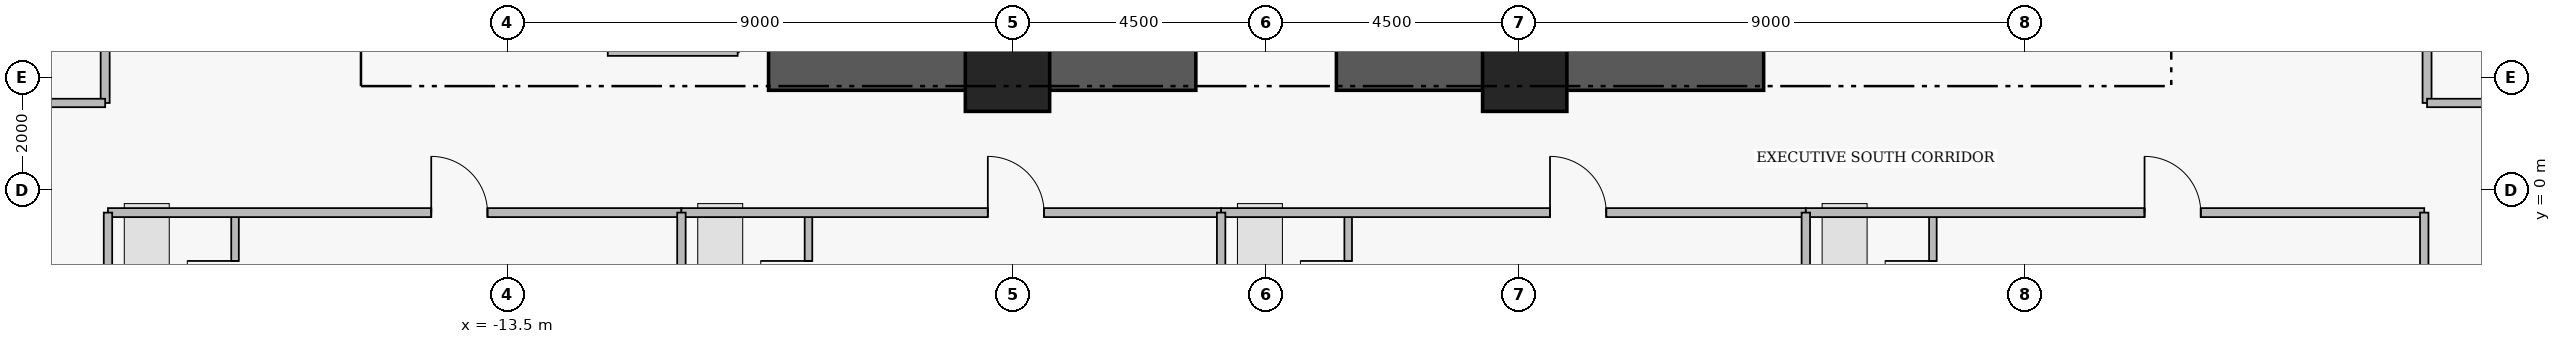
"""IFC4 building model, lengths in metres.
Left out: names, types, materials, properties, quantities, classifications, styles, units other than length and angle.
Written with IfcOpenShell. Run it as: python <this file> out.ifc"""

import sys

from ifc_helpers import new_model, si_unit, direction, frame, frame_2d, origin, origin_2d, place, context, subcontext, project, spatial, rectangle, extrude, element, fill, save


model = new_model("IFC4")
c1 = context("Model", 3, precision=1e-05, world=origin(), true_north=direction((0.0, 1.0)))
c2 = subcontext(c1, "Body", "Model", "MODEL_VIEW")
j1 = project(units=[si_unit("LENGTHUNIT", "METRE"), si_unit("PLANEANGLEUNIT", "RADIAN")], contexts=[c1])
p1 = place(None, origin())
s1 = spatial("IfcSite", under=j1, at=p1, CompositionType="ELEMENT")
p2 = place(p1, origin())
s2 = spatial("IfcBuilding", under=s1, at=p2, CompositionType="ELEMENT")
p3 = place(p2, frame((0.0, 0.0, 139.45)))
s3 = spatial("IfcBuildingStorey", under=s2, at=p3, CompositionType="ELEMENT", Elevation=139.45)
for number, where, z_axis, x_axis in (
    (1, (-8.85, 2.15, 0.0), (0.0, 0.0, 1.0), (1.0, 0.0, 0.0)),
    (2, (1.25, 2.15, 0.0), (0.0, 0.0, 1.0), (1.0, 0.0, 0.0)),
):
    element("IfcWall", number, at=place(p3, frame(where, z_axis=z_axis, x_axis=x_axis)), inside=s3, PredefinedType="SHEAR", context=c2, shape_type="SweptSolid", body=[
        extrude(rectangle(XDim=7.6, YDim=0.75, at=frame_2d((3.8, 0.0))), origin(), (0.0, 0.0, 1.0), 3.43),
    ])
for number, where, z_axis, x_axis in (
    (3, (-4.6, 2.15, 0.0), (0.0, 0.0, 1.0), (1.0, 0.0, 0.0)),
    (4, (4.6, 2.15, 0.0), (0.0, 0.0, 1.0), (1.0, 0.0, 0.0)),
):
    element("IfcColumn", number, at=place(p3, frame(where, z_axis=z_axis, x_axis=x_axis)), inside=s3, PredefinedType="COLUMN", context=c2, shape_type="SweptSolid", body=[
        extrude(rectangle(XDim=1.5, YDim=1.5, at=origin_2d()), origin(), (0.0, 0.0, 1.0), 3.65),
    ])
p4 = place(p3, frame((-18.34, -2.76, 0.0), z_axis=(0.0, 0.0, 1.0), x_axis=(0.0, 1.0, 0.0)))
e5 = element("IfcWall", 5, at=p4, inside=s3, PredefinedType="PLUMBINGWALL", context=c2, shape_type="SweptSolid", body=[
    extrude(rectangle(XDim=2.36, YDim=0.135, at=frame_2d((1.18, 0.0))), origin(), (0.0, 0.0, 1.0), 3.43),
])
p5 = place(p4, frame((0.65, 0.0, 0.0)))
e6 = element("IfcOpeningElement", 6, at=p5, cuts=e5, PredefinedType="OPENING", context=c2, shape_type="SweptSolid", body=[
    extrude(rectangle(XDim=0.85, YDim=2.1, at=frame_2d((0.425, 1.05))), frame((0.0, 0.077, 0.0), z_axis=(0.0, -1.0, 0.0), x_axis=(1.0, 0.0, 0.0)), (0.0, 0.0, 1.0), 0.155),
])
p6 = place(p3, frame((-20.6, -0.4, 0.0), z_axis=(0.0, 0.0, 1.0), x_axis=(1.0, 0.0, 0.0)))
e7 = element("IfcWall", 7, at=p6, inside=s3, PredefinedType="PARTITIONING", context=c2, shape_type="SweptSolid", body=[
    extrude(rectangle(XDim=10.2, YDim=0.16, at=frame_2d((5.1, 0.0))), origin(), (0.0, 0.0, 1.0), 3.43),
])
p7 = place(p6, frame((5.75, 0.0, 0.0)))
e8 = element("IfcOpeningElement", 8, at=p7, cuts=e7, PredefinedType="OPENING", context=c2, shape_type="SweptSolid", body=[
    extrude(rectangle(XDim=1.0, YDim=2.15, at=frame_2d((0.5, 1.075))), frame((0.0, 0.09, 0.0), z_axis=(0.0, -1.0, 0.0), x_axis=(1.0, 0.0, 0.0)), (0.0, 0.0, 1.0), 0.18),
])
p8 = place(p3, frame((-8.14, -2.76, 0.0), z_axis=(0.0, 0.0, 1.0), x_axis=(0.0, 1.0, 0.0)))
e9 = element("IfcWall", 9, at=p8, inside=s3, PredefinedType="PLUMBINGWALL", context=c2, shape_type="SweptSolid", body=[
    extrude(rectangle(XDim=2.36, YDim=0.135, at=frame_2d((1.18, 0.0))), origin(), (0.0, 0.0, 1.0), 3.43),
])
p9 = place(p8, frame((0.65, 0.0, 0.0)))
e10 = element("IfcOpeningElement", 10, at=p9, cuts=e9, PredefinedType="OPENING", context=c2, shape_type="SweptSolid", body=[
    extrude(rectangle(XDim=0.85, YDim=2.1, at=frame_2d((0.425, 1.05))), frame((0.0, 0.077, 0.0), z_axis=(0.0, -1.0, 0.0), x_axis=(1.0, 0.0, 0.0)), (0.0, 0.0, 1.0), 0.155),
])
p10 = place(p3, frame((-10.4, -0.4, 0.0), z_axis=(0.0, 0.0, 1.0), x_axis=(1.0, 0.0, 0.0)))
e11 = element("IfcWall", 11, at=p10, inside=s3, PredefinedType="PARTITIONING", context=c2, shape_type="SweptSolid", body=[
    extrude(rectangle(XDim=9.6, YDim=0.16, at=frame_2d((4.8, 0.0))), origin(), (0.0, 0.0, 1.0), 3.43),
])
p11 = place(p10, frame((5.45, 0.0, 0.0)))
e12 = element("IfcOpeningElement", 12, at=p11, cuts=e11, PredefinedType="OPENING", context=c2, shape_type="SweptSolid", body=[
    extrude(rectangle(XDim=1.0, YDim=2.15, at=frame_2d((0.5, 1.075))), frame((0.0, 0.09, 0.0), z_axis=(0.0, -1.0, 0.0), x_axis=(1.0, 0.0, 0.0)), (0.0, 0.0, 1.0), 0.18),
])
p12 = place(p3, frame((1.46, -2.76, 0.0), z_axis=(0.0, 0.0, 1.0), x_axis=(0.0, 1.0, 0.0)))
e13 = element("IfcWall", 13, at=p12, inside=s3, PredefinedType="PLUMBINGWALL", context=c2, shape_type="SweptSolid", body=[
    extrude(rectangle(XDim=2.36, YDim=0.135, at=frame_2d((1.18, 0.0))), origin(), (0.0, 0.0, 1.0), 3.43),
])
p13 = place(p12, frame((0.65, 0.0, 0.0)))
e14 = element("IfcOpeningElement", 14, at=p13, cuts=e13, PredefinedType="OPENING", context=c2, shape_type="SweptSolid", body=[
    extrude(rectangle(XDim=0.85, YDim=2.1, at=frame_2d((0.425, 1.05))), frame((0.0, 0.077, 0.0), z_axis=(0.0, -1.0, 0.0), x_axis=(1.0, 0.0, 0.0)), (0.0, 0.0, 1.0), 0.155),
])
p14 = place(p3, frame((-0.8, -0.4, 0.0), z_axis=(0.0, 0.0, 1.0), x_axis=(1.0, 0.0, 0.0)))
e15 = element("IfcWall", 15, at=p14, inside=s3, PredefinedType="PARTITIONING", context=c2, shape_type="SweptSolid", body=[
    extrude(rectangle(XDim=10.4, YDim=0.16, at=frame_2d((5.2, 0.0))), origin(), (0.0, 0.0, 1.0), 3.43),
])
p15 = place(p14, frame((5.85, 0.0, 0.0)))
e16 = element("IfcOpeningElement", 16, at=p15, cuts=e15, PredefinedType="OPENING", context=c2, shape_type="SweptSolid", body=[
    extrude(rectangle(XDim=1.0, YDim=2.15, at=frame_2d((0.5, 1.075))), frame((0.0, 0.09, 0.0), z_axis=(0.0, -1.0, 0.0), x_axis=(1.0, 0.0, 0.0)), (0.0, 0.0, 1.0), 0.18),
])
p16 = place(p3, frame((11.86, -2.76, 0.0), z_axis=(0.0, 0.0, 1.0), x_axis=(0.0, 1.0, 0.0)))
e17 = element("IfcWall", 17, at=p16, inside=s3, PredefinedType="PLUMBINGWALL", context=c2, shape_type="SweptSolid", body=[
    extrude(rectangle(XDim=2.36, YDim=0.135, at=frame_2d((1.18, 0.0))), origin(), (0.0, 0.0, 1.0), 3.43),
])
p17 = place(p16, frame((0.65, 0.0, 0.0)))
e18 = element("IfcOpeningElement", 18, at=p17, cuts=e17, PredefinedType="OPENING", context=c2, shape_type="SweptSolid", body=[
    extrude(rectangle(XDim=0.85, YDim=2.1, at=frame_2d((0.425, 1.05))), frame((0.0, 0.077, 0.0), z_axis=(0.0, -1.0, 0.0), x_axis=(1.0, 0.0, 0.0)), (0.0, 0.0, 1.0), 0.155),
])
p18 = place(p3, frame((9.6, -0.4, 0.0), z_axis=(0.0, 0.0, 1.0), x_axis=(1.0, 0.0, 0.0)))
e19 = element("IfcWall", 19, at=p18, inside=s3, PredefinedType="PARTITIONING", context=c2, shape_type="SweptSolid", body=[
    extrude(rectangle(XDim=11.0, YDim=0.16, at=frame_2d((5.5, 0.0))), origin(), (0.0, 0.0, 1.0), 3.43),
])
p19 = place(p18, frame((6.025, 0.0, 0.0)))
e20 = element("IfcOpeningElement", 20, at=p19, cuts=e19, PredefinedType="OPENING", context=c2, shape_type="SweptSolid", body=[
    extrude(rectangle(XDim=1.0, YDim=2.15, at=frame_2d((0.5, 1.075))), frame((0.0, 0.09, 0.0), z_axis=(0.0, -1.0, 0.0), x_axis=(1.0, 0.0, 0.0)), (0.0, 0.0, 1.0), 0.18),
])
p20 = place(p3, frame((20.65, 1.55, 0.0), z_axis=(0.0, 0.0, 1.0), x_axis=(0.0, 1.0, 0.0)))
e21 = element("IfcWall", 21, at=p20, inside=s3, PredefinedType="PARTITIONING", context=c2, shape_type="SweptSolid", body=[
    extrude(rectangle(XDim=5.2, YDim=0.16, at=frame_2d((2.6, 0.0))), origin(), (0.0, 0.0, 1.0), 3.43),
])
p21 = place(p20, frame((2.14, 0.0, 0.0)))
e22 = element("IfcOpeningElement", 22, at=p21, cuts=e21, PredefinedType="OPENING", context=c2, shape_type="SweptSolid", body=[
    extrude(rectangle(XDim=0.92, YDim=2.12, at=frame_2d((0.46, 1.06))), frame((0.0, 0.09, 0.0), z_axis=(0.0, -1.0, 0.0), x_axis=(1.0, 0.0, 0.0)), (0.0, 0.0, 1.0), 0.18),
])
p22 = place(p3, frame((-20.65, 1.55, 0.0), z_axis=(0.0, 0.0, 1.0), x_axis=(0.0, 1.0, 0.0)))
e23 = element("IfcWall", 23, at=p22, inside=s3, PredefinedType="PARTITIONING", context=c2, shape_type="SweptSolid", body=[
    extrude(rectangle(XDim=13.3, YDim=0.16, at=frame_2d((6.65, 0.0))), origin(), (0.0, 0.0, 1.0), 3.43),
])
p23 = place(p22, frame((6.175, 0.0, 0.0)))
e24 = element("IfcOpeningElement", 24, at=p23, cuts=e23, PredefinedType="OPENING", context=c2, shape_type="SweptSolid", body=[
    extrude(rectangle(XDim=0.95, YDim=2.15, at=frame_2d((0.475, 1.075))), frame((0.0, 0.09, 0.0), z_axis=(0.0, -1.0, 0.0), x_axis=(1.0, 0.0, 0.0)), (0.0, 0.0, 1.0), 0.18),
])
p24 = place(p3, frame((-11.71, 2.47, 0.0), z_axis=(0.0, 0.0, 1.0), x_axis=(1.0, 0.0, 0.0)))
e25 = element("IfcWall", 25, at=p24, inside=s3, PredefinedType="PARTITIONING", context=c2, shape_type="SweptSolid", body=[
    extrude(rectangle(XDim=2.31, YDim=0.165, at=frame_2d((1.155, 0.0))), origin(), (0.0, 0.0, 1.0), 2.03),
])
p25 = place(p3, frame((-20.6, -11.9, 0.0), z_axis=(0.0, 0.0, 1.0), x_axis=(0.0, 1.0, 0.0)))
e26 = element("IfcWall", 26, at=p25, inside=s3, PredefinedType="PARTITIONING", context=c2, shape_type="SweptSolid", body=[
    extrude(rectangle(XDim=11.5, YDim=0.15, at=frame_2d((5.75, 0.0))), origin(), (0.0, 0.0, 1.0), 3.43),
])
for number, where, z_axis, x_axis in (
    (27, (-10.4, -15.32, 0.0), (0.0, 0.0, 1.0), (0.0, 1.0, 0.0)),
    (28, (-0.8, -15.32, 0.0), (0.0, 0.0, 1.0), (0.0, 1.0, 0.0)),
    (29, (9.6, -15.32, 0.0), (0.0, 0.0, 1.0), (0.0, 1.0, 0.0)),
):
    element("IfcWall", number, at=place(p3, frame(where, z_axis=z_axis, x_axis=x_axis)), inside=s3, PredefinedType="PARTITIONING", context=c2, shape_type="SweptSolid", body=[
        extrude(rectangle(XDim=14.92, YDim=0.15, at=frame_2d((7.46, 0.0))), origin(), (0.0, 0.0, 1.0), 3.43),
    ])
p26 = place(p3, frame((20.6, -11.9, 0.0), z_axis=(0.0, 0.0, 1.0), x_axis=(0.0, 1.0, 0.0)))
e30 = element("IfcWall", 30, at=p26, inside=s3, PredefinedType="PARTITIONING", context=c2, shape_type="SweptSolid", body=[
    extrude(rectangle(XDim=11.5, YDim=0.15, at=frame_2d((5.75, 0.0))), origin(), (0.0, 0.0, 1.0), 3.43),
])
for number, where, z_axis, x_axis in (
    (31, (20.65, 1.55, 0.0), (0.0, 0.0, 1.0), (1.0, 0.0, 0.0)),
    (32, (-23.867, 1.55, 0.0), (0.0, 0.0, 1.0), (1.0, 0.0, 0.0)),
):
    element("IfcWall", number, at=place(p3, frame(where, z_axis=z_axis, x_axis=x_axis)), inside=s3, PredefinedType="PARTITIONING", context=c2, shape_type="SweptSolid", body=[
        extrude(rectangle(XDim=3.217, YDim=0.15, at=frame_2d((1.608, 0.0))), origin(), (0.0, 0.0, 1.0), 3.43),
    ])
p27 = place(p5, origin())
e33 = element("IfcDoor", 33, at=p27, inside=s3, OperationType="SINGLE_SWING_RIGHT", PredefinedType="DOOR", context=c2, shape_type="SweptSolid", body=[
    extrude(rectangle(XDim=0.85, YDim=2.1, at=frame_2d((0.425, 1.05))), frame((0.0, 0.025, 0.0), z_axis=(0.0, -1.0, 0.0), x_axis=(1.0, 0.0, 0.0)), (0.0, 0.0, 1.0), 0.05),
])
fill(e6, e33)
p28 = place(p7, origin())
e34 = element("IfcDoor", 34, at=p28, inside=s3, OperationType="SINGLE_SWING_LEFT", PredefinedType="DOOR", context=c2, shape_type="SweptSolid", body=[
    extrude(rectangle(XDim=1.0, YDim=2.15, at=frame_2d((0.5, 1.075))), frame((0.0, 0.025, 0.0), z_axis=(0.0, -1.0, 0.0), x_axis=(1.0, 0.0, 0.0)), (0.0, 0.0, 1.0), 0.05),
])
fill(e8, e34)
p29 = place(p9, origin())
e35 = element("IfcDoor", 35, at=p29, inside=s3, OperationType="SINGLE_SWING_RIGHT", PredefinedType="DOOR", context=c2, shape_type="SweptSolid", body=[
    extrude(rectangle(XDim=0.85, YDim=2.1, at=frame_2d((0.425, 1.05))), frame((0.0, 0.025, 0.0), z_axis=(0.0, -1.0, 0.0), x_axis=(1.0, 0.0, 0.0)), (0.0, 0.0, 1.0), 0.05),
])
fill(e10, e35)
p30 = place(p11, origin())
e36 = element("IfcDoor", 36, at=p30, inside=s3, OperationType="SINGLE_SWING_LEFT", PredefinedType="DOOR", context=c2, shape_type="SweptSolid", body=[
    extrude(rectangle(XDim=1.0, YDim=2.15, at=frame_2d((0.5, 1.075))), frame((0.0, 0.025, 0.0), z_axis=(0.0, -1.0, 0.0), x_axis=(1.0, 0.0, 0.0)), (0.0, 0.0, 1.0), 0.05),
])
fill(e12, e36)
p31 = place(p13, origin())
e37 = element("IfcDoor", 37, at=p31, inside=s3, OperationType="SINGLE_SWING_RIGHT", PredefinedType="DOOR", context=c2, shape_type="SweptSolid", body=[
    extrude(rectangle(XDim=0.85, YDim=2.1, at=frame_2d((0.425, 1.05))), frame((0.0, 0.025, 0.0), z_axis=(0.0, -1.0, 0.0), x_axis=(1.0, 0.0, 0.0)), (0.0, 0.0, 1.0), 0.05),
])
fill(e14, e37)
p32 = place(p15, origin())
e38 = element("IfcDoor", 38, at=p32, inside=s3, OperationType="SINGLE_SWING_LEFT", PredefinedType="DOOR", context=c2, shape_type="SweptSolid", body=[
    extrude(rectangle(XDim=1.0, YDim=2.15, at=frame_2d((0.5, 1.075))), frame((0.0, 0.025, 0.0), z_axis=(0.0, -1.0, 0.0), x_axis=(1.0, 0.0, 0.0)), (0.0, 0.0, 1.0), 0.05),
])
fill(e16, e38)
p33 = place(p17, origin())
e39 = element("IfcDoor", 39, at=p33, inside=s3, OperationType="SINGLE_SWING_RIGHT", PredefinedType="DOOR", context=c2, shape_type="SweptSolid", body=[
    extrude(rectangle(XDim=0.85, YDim=2.1, at=frame_2d((0.425, 1.05))), frame((0.0, 0.025, 0.0), z_axis=(0.0, -1.0, 0.0), x_axis=(1.0, 0.0, 0.0)), (0.0, 0.0, 1.0), 0.05),
])
fill(e18, e39)
p34 = place(p19, origin())
e40 = element("IfcDoor", 40, at=p34, inside=s3, OperationType="SINGLE_SWING_LEFT", PredefinedType="DOOR", context=c2, shape_type="SweptSolid", body=[
    extrude(rectangle(XDim=1.0, YDim=2.15, at=frame_2d((0.5, 1.075))), frame((0.0, 0.025, 0.0), z_axis=(0.0, -1.0, 0.0), x_axis=(1.0, 0.0, 0.0)), (0.0, 0.0, 1.0), 0.05),
])
fill(e20, e40)
save(model, sys.argv[1])
